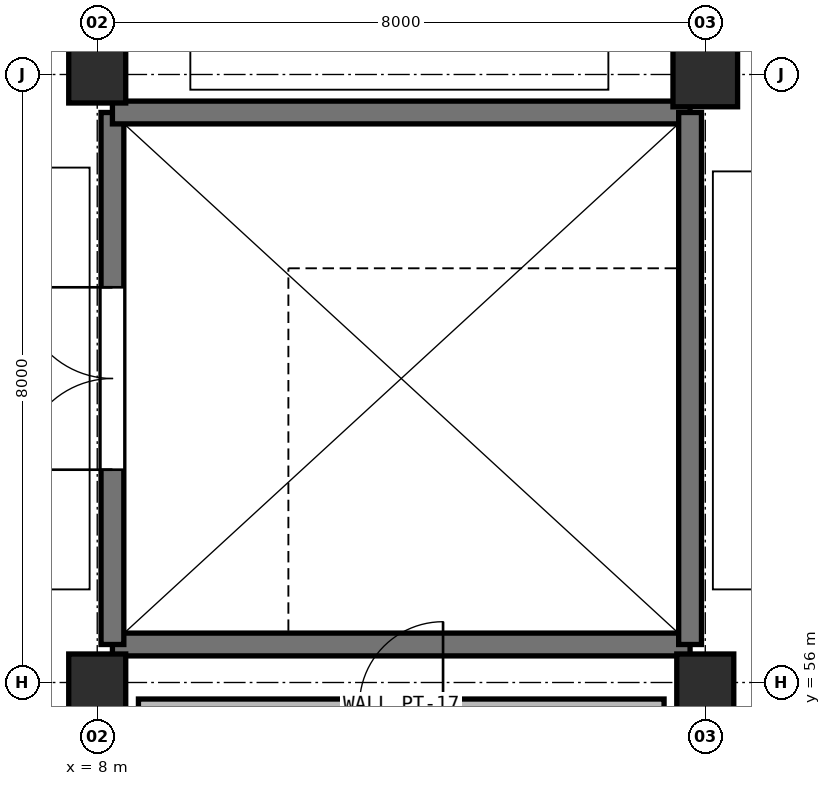
"""IFC4 building model, lengths in metres.
Left out: names, types, materials, properties, quantities, classifications, styles, units other than length and angle.
Written with IfcOpenShell. Run it as: python <this file> out.ifc"""

import sys

from ifc_helpers import new_model, si_unit, direction, frame, frame_2d, origin, origin_2d, place, context, subcontext, project, spatial, rectangle, extrude, element, fill, save


model = new_model("IFC4")
c1 = context("Model", 3, precision=1e-05, world=origin(), true_north=direction((0.0, 1.0)))
c2 = subcontext(c1, "Body", "Model", "MODEL_VIEW")
j1 = project(units=[si_unit("LENGTHUNIT", "METRE"), si_unit("PLANEANGLEUNIT", "RADIAN")], contexts=[c1])
p1 = place(None, origin())
s1 = spatial("IfcSite", under=j1, at=p1, CompositionType="ELEMENT")
p2 = place(p1, origin())
s2 = spatial("IfcBuilding", under=s1, at=p2, CompositionType="ELEMENT")
p3 = place(p2, frame((0.0, 0.0, 5.4)))
s3 = spatial("IfcBuildingStorey", under=s2, at=p3, CompositionType="ELEMENT", Elevation=5.4)
for number, where, z_axis, x_axis in (
    (1, (8.0, 56.0, 0.0), (0.0, 0.0, 1.0), (1.0, 0.0, 0.0)),
    (2, (8.0, 64.0, 0.0), (0.0, 0.0, 1.0), (1.0, 0.0, 0.0)),
    (3, (16.0, 56.0, 0.0), (0.0, 0.0, 1.0), (1.0, 0.0, 0.0)),
):
    element("IfcColumn", number, at=place(p3, frame(where, z_axis=z_axis, x_axis=x_axis)), inside=s3, PredefinedType="COLUMN", context=c2, shape_type="SweptSolid", body=[
        extrude(rectangle(XDim=0.75, YDim=0.75, at=origin_2d()), origin(), (0.0, 0.0, 1.0), 4.8),
    ])
p4 = place(p3, frame((16.0, 64.0, 0.0), z_axis=(0.0, 0.0, 1.0), x_axis=(1.0, 0.0, 0.0)))
e4 = element("IfcColumn", 4, at=p4, inside=s3, PredefinedType="COLUMN", context=c2, shape_type="SweptSolid", body=[
    extrude(rectangle(XDim=0.85, YDim=0.85, at=origin_2d()), origin(), (0.0, 0.0, 1.0), 4.8),
])
p5 = place(p3, frame((15.8, 56.5, 0.0), z_axis=(0.0, 0.0, 1.0), x_axis=(-1.0, 0.0, 0.0)))
e5 = element("IfcWall", 5, at=p5, inside=s3, PredefinedType="SHEAR", context=c2, shape_type="SweptSolid", body=[
    extrude(rectangle(XDim=7.6, YDim=0.3, at=frame_2d((3.8, 0.0))), origin(), (0.0, 0.0, 1.0), 4.48),
])
p6 = place(p3, frame((8.2, 56.5, 0.0), z_axis=(0.0, 0.0, 1.0), x_axis=(0.0, 1.0, 0.0)))
e6 = element("IfcWall", 6, at=p6, inside=s3, PredefinedType="SHEAR", context=c2, shape_type="SweptSolid", body=[
    extrude(rectangle(XDim=7.0, YDim=0.3, at=frame_2d((3.5, 0.0))), origin(), (0.0, 0.0, 1.0), 4.48),
])
p7 = place(p6, frame((2.3, 0.0, 0.0)))
e7 = element("IfcOpeningElement", 7, at=p7, cuts=e6, PredefinedType="OPENING", context=c2, shape_type="SweptSolid", body=[
    extrude(rectangle(XDim=2.4, YDim=2.2, at=frame_2d((1.2, 1.1))), frame((0.0, 0.16, 0.0), z_axis=(0.0, -1.0, 0.0), x_axis=(1.0, 0.0, 0.0)), (0.0, 0.0, 1.0), 0.32),
])
p8 = place(p3, frame((8.2, 63.5, 0.0), z_axis=(0.0, 0.0, 1.0), x_axis=(1.0, 0.0, 0.0)))
e8 = element("IfcWall", 8, at=p8, inside=s3, PredefinedType="SHEAR", context=c2, shape_type="SweptSolid", body=[
    extrude(rectangle(XDim=7.6, YDim=0.3, at=frame_2d((3.8, 0.0))), origin(), (0.0, 0.0, 1.0), 4.48),
])
p9 = place(p3, frame((15.8, 63.5, 0.0), z_axis=(0.0, 0.0, 1.0), x_axis=(0.0, -1.0, 0.0)))
e9 = element("IfcWall", 9, at=p9, inside=s3, PredefinedType="SHEAR", context=c2, shape_type="SweptSolid", body=[
    extrude(rectangle(XDim=7.0, YDim=0.3, at=frame_2d((3.5, 0.0))), origin(), (0.0, 0.0, 1.0), 4.48),
])
p10 = place(p3, frame((8.542, 55.7, 0.0), z_axis=(0.0, 0.0, 1.0), x_axis=(1.0, 0.0, 0.0)))
e10 = element("IfcWall", 10, at=p10, inside=s3, PredefinedType="PARTITIONING", context=c2, shape_type="SweptSolid", body=[
    extrude(rectangle(XDim=6.916, YDim=0.165, at=frame_2d((3.458, 0.0))), origin(), (0.0, 0.0, 1.0), 3.45),
])
p11 = place(p10, frame((2.908, 0.0, 0.0)))
e11 = element("IfcOpeningElement", 11, at=p11, cuts=e10, PredefinedType="OPENING", context=c2, shape_type="SweptSolid", body=[
    extrude(rectangle(XDim=1.1, YDim=2.15, at=frame_2d((0.55, 1.075))), frame((0.0, 0.093, 0.0), z_axis=(0.0, -1.0, 0.0), x_axis=(1.0, 0.0, 0.0)), (0.0, 0.0, 1.0), 0.185),
])
p12 = place(p7, frame((2.4, 0.0, 0.0), z_axis=(0.0, 0.0, 1.0), x_axis=(-1.0, 0.0, 0.0)))
e12 = element("IfcDoor", 12, at=p12, inside=s3, OperationType="DOUBLE_DOOR_SINGLE_SWING", PredefinedType="DOOR", context=c2, shape_type="SweptSolid", body=[
    extrude(rectangle(XDim=2.4, YDim=2.2, at=frame_2d((1.2, 1.1))), frame((0.0, 0.025, 0.0), z_axis=(0.0, -1.0, 0.0), x_axis=(1.0, 0.0, 0.0)), (0.0, 0.0, 1.0), 0.05),
])
fill(e7, e12)
p13 = place(p11, origin())
e13 = element("IfcDoor", 13, at=p13, inside=s3, OperationType="SINGLE_SWING_RIGHT", PredefinedType="DOOR", context=c2, shape_type="SweptSolid", body=[
    extrude(rectangle(XDim=1.1, YDim=2.15, at=frame_2d((0.55, 1.075))), frame((0.0, 0.025, 0.0), z_axis=(0.0, -1.0, 0.0), x_axis=(1.0, 0.0, 0.0)), (0.0, 0.0, 1.0), 0.05),
])
fill(e11, e13)
save(model, sys.argv[1])
